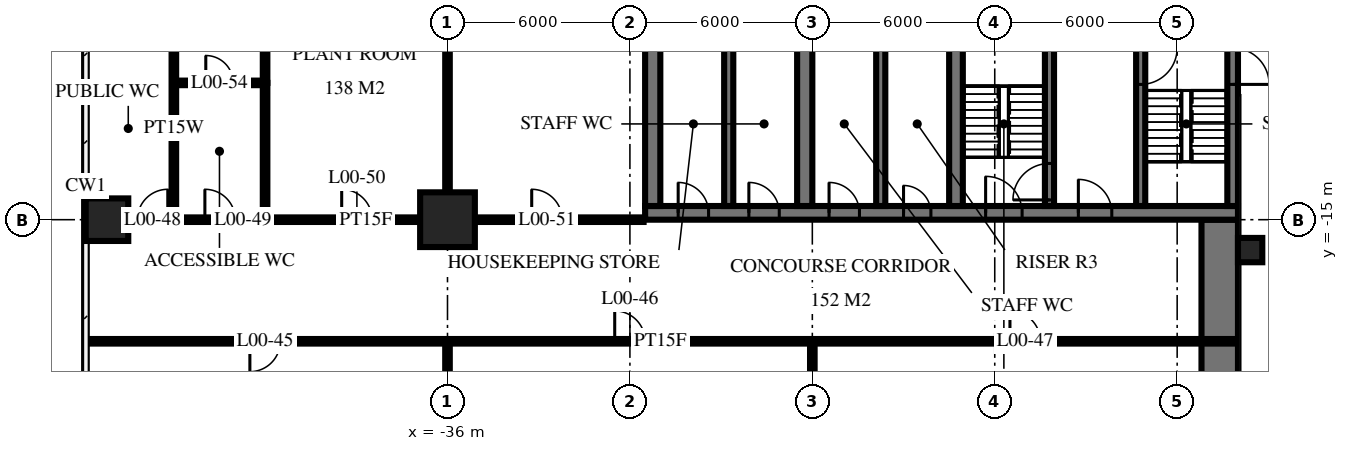
"""IFC4 building model, lengths in metres.
Left out: names, types, materials, properties, quantities, classifications, styles, units other than length and angle.
Written with IfcOpenShell. Run it as: python <this file> out.ifc"""

import sys

from ifc_helpers import new_model, si_unit, direction, frame, frame_2d, origin, origin_2d, place, context, subcontext, project, spatial, rectangle, circle, extrude, element, fill, save


model = new_model("IFC4")
c1 = context("Model", 3, precision=1e-05, world=origin(), true_north=direction((0.0, 1.0)))
c2 = subcontext(c1, "Body", "Model", "MODEL_VIEW")
j1 = project(units=[si_unit("LENGTHUNIT", "METRE"), si_unit("PLANEANGLEUNIT", "RADIAN")], contexts=[c1])
p1 = place(None, origin())
s1 = spatial("IfcSite", under=j1, at=p1, CompositionType="ELEMENT")
p2 = place(p1, origin())
s2 = spatial("IfcBuilding", under=s1, at=p2, CompositionType="ELEMENT")
p3 = place(p2, origin())
s3 = spatial("IfcBuildingStorey", under=s2, at=p3, CompositionType="ELEMENT", Elevation=0.0)
p4 = place(p3, frame((-47.2, -15.0, -0.3), z_axis=(0.0, 0.0, 1.0), x_axis=(1.0, 0.0, 0.0)))
e1 = element("IfcColumn", 1, at=p4, inside=s3, PredefinedType="COLUMN", context=c2, shape_type="SweptSolid", body=[
    extrude(circle(Radius=0.7, at=origin_2d()), origin(), (0.0, 0.0, 1.0), 7.3),
])
p5 = place(p3, frame((-36.0, -15.0, -0.3), z_axis=(0.0, 0.0, 1.0), x_axis=(1.0, 0.0, 0.0)))
e2 = element("IfcColumn", 2, at=p5, inside=s3, PredefinedType="COLUMN", context=c2, shape_type="SweptSolid", body=[
    extrude(circle(Radius=0.9, at=origin_2d()), origin(), (0.0, 0.0, 1.0), 7.3),
])
p6 = place(p3, frame((-29.5, -14.775, -0.3), z_axis=(0.0, 0.0, 1.0), x_axis=(1.0, 0.0, 0.0)))
e3 = element("IfcWall", 3, at=p6, inside=s3, PredefinedType="SHEAR", context=c2, shape_type="SweptSolid", body=[
    extrude(rectangle(XDim=19.5, YDim=0.45, at=frame_2d((9.75, 0.0))), origin(), (0.0, 0.0, 1.0), 7.3),
])
p7 = place(p6, frame((11.2, 0.0, 0.3)))
e4 = element("IfcOpeningElement", 4, at=p7, cuts=e3, PredefinedType="OPENING", context=c2, shape_type="SweptSolid", body=[
    extrude(rectangle(XDim=1.2, YDim=2.1, at=frame_2d((0.6, 1.05))), frame((0.0, 0.235, 0.0), z_axis=(0.0, -1.0, 0.0), x_axis=(1.0, 0.0, 0.0)), (0.0, 0.0, 1.0), 0.47),
])
p8 = place(p6, frame((14.25, 0.0, 0.3)))
e5 = element("IfcOpeningElement", 5, at=p8, cuts=e3, PredefinedType="OPENING", context=c2, shape_type="SweptSolid", body=[
    extrude(rectangle(XDim=1.1, YDim=2.1, at=frame_2d((0.55, 1.05))), frame((0.0, 0.235, 0.0), z_axis=(0.0, -1.0, 0.0), x_axis=(1.0, 0.0, 0.0)), (0.0, 0.0, 1.0), 0.47),
])
p9 = place(p6, frame((8.5, 0.0, 0.3)))
e6 = element("IfcOpeningElement", 6, at=p9, cuts=e3, PredefinedType="OPENING", context=c2, shape_type="SweptSolid", body=[
    extrude(rectangle(XDim=0.9, YDim=2.1, at=frame_2d((0.45, 1.05))), frame((0.0, 0.235, 0.0), z_axis=(0.0, -1.0, 0.0), x_axis=(1.0, 0.0, 0.0)), (0.0, 0.0, 1.0), 0.47),
])
p10 = place(p6, frame((6.05, 0.0, 0.3)))
e7 = element("IfcOpeningElement", 7, at=p10, cuts=e3, PredefinedType="OPENING", context=c2, shape_type="SweptSolid", body=[
    extrude(rectangle(XDim=1.0, YDim=2.1, at=frame_2d((0.5, 1.05))), frame((0.0, 0.235, 0.0), z_axis=(0.0, -1.0, 0.0), x_axis=(1.0, 0.0, 0.0)), (0.0, 0.0, 1.0), 0.47),
])
p11 = place(p6, frame((3.413, 0.0, 0.3)))
e8 = element("IfcOpeningElement", 8, at=p11, cuts=e3, PredefinedType="OPENING", context=c2, shape_type="SweptSolid", body=[
    extrude(rectangle(XDim=1.0, YDim=2.1, at=frame_2d((0.5, 1.05))), frame((0.0, 0.235, 0.0), z_axis=(0.0, -1.0, 0.0), x_axis=(1.0, 0.0, 0.0)), (0.0, 0.0, 1.0), 0.47),
])
p12 = place(p6, frame((1.087, 0.0, 0.3)))
e9 = element("IfcOpeningElement", 9, at=p12, cuts=e3, PredefinedType="OPENING", context=c2, shape_type="SweptSolid", body=[
    extrude(rectangle(XDim=1.0, YDim=2.1, at=frame_2d((0.5, 1.05))), frame((0.0, 0.235, 0.0), z_axis=(0.0, -1.0, 0.0), x_axis=(1.0, 0.0, 0.0)), (0.0, 0.0, 1.0), 0.47),
])
p13 = place(p3, frame((-10.175, -14.55, -0.3), z_axis=(0.0, 0.0, 1.0), x_axis=(0.0, 1.0, 0.0)))
e10 = element("IfcWall", 10, at=p13, inside=s3, PredefinedType="SHEAR", context=c2, shape_type="SweptSolid", body=[
    extrude(rectangle(XDim=14.1, YDim=0.35, at=frame_2d((7.05, 0.0))), origin(), (0.0, 0.0, 1.0), 7.3),
])
p14 = place(p13, frame((8.4, 0.0, 0.3)))
e11 = element("IfcOpeningElement", 11, at=p14, cuts=e10, PredefinedType="OPENING", context=c2, shape_type="SweptSolid", body=[
    extrude(rectangle(XDim=1.4, YDim=2.4, at=frame_2d((0.7, 1.2))), frame((0.0, 0.185, 0.0), z_axis=(0.0, -1.0, 0.0), x_axis=(1.0, 0.0, 0.0)), (0.0, 0.0, 1.0), 0.37),
])
p15 = place(p13, frame((10.0, 0.0, 0.3)))
e12 = element("IfcOpeningElement", 12, at=p15, cuts=e10, PredefinedType="OPENING", context=c2, shape_type="SweptSolid", body=[
    extrude(rectangle(XDim=1.4, YDim=2.4, at=frame_2d((0.7, 1.2))), frame((0.0, 0.185, 0.0), z_axis=(0.0, -1.0, 0.0), x_axis=(1.0, 0.0, 0.0)), (0.0, 0.0, 1.0), 0.37),
])
p16 = place(p13, frame((4.0, 0.0, 0.3)))
e13 = element("IfcOpeningElement", 13, at=p16, cuts=e10, PredefinedType="OPENING", context=c2, shape_type="SweptSolid", body=[
    extrude(rectangle(XDim=1.2, YDim=2.1, at=frame_2d((0.6, 1.05))), frame((0.0, 0.185, 0.0), z_axis=(0.0, -1.0, 0.0), x_axis=(1.0, 0.0, 0.0)), (0.0, 0.0, 1.0), 0.37),
])
p17 = place(p3, frame((-29.25, -14.55, -0.3), z_axis=(0.0, 0.0, 1.0), x_axis=(0.0, 1.0, 0.0)))
e14 = element("IfcWall", 14, at=p17, inside=s3, PredefinedType="SHEAR", context=c2, shape_type="SweptSolid", body=[
    extrude(rectangle(XDim=14.1, YDim=0.5, at=frame_2d((7.05, 0.0))), origin(), (0.0, 0.0, 1.0), 7.3),
])
p18 = place(p3, frame((-13.2, -14.55, -0.3), z_axis=(0.0, 0.0, 1.0), x_axis=(0.0, 1.0, 0.0)))
e15 = element("IfcWall", 15, at=p18, inside=s3, PredefinedType="SHEAR", context=c2, shape_type="SweptSolid", body=[
    extrude(rectangle(XDim=5.4, YDim=0.3, at=frame_2d((2.7, 0.0))), origin(), (0.0, 0.0, 1.0), 7.3),
])
p19 = place(p18, frame((4.0, 0.0, 0.3)))
e16 = element("IfcOpeningElement", 16, at=p19, cuts=e15, PredefinedType="OPENING", context=c2, shape_type="SweptSolid", body=[
    extrude(rectangle(XDim=1.2, YDim=2.1, at=frame_2d((0.6, 1.05))), frame((0.0, 0.16, 0.0), z_axis=(0.0, -1.0, 0.0), x_axis=(1.0, 0.0, 0.0)), (0.0, 0.0, 1.0), 0.32),
])
p20 = place(p3, frame((-16.2, -14.55, -0.3), z_axis=(0.0, 0.0, 1.0), x_axis=(0.0, 1.0, 0.0)))
e17 = element("IfcWall", 17, at=p20, inside=s3, PredefinedType="SHEAR", context=c2, shape_type="SweptSolid", body=[
    extrude(rectangle(XDim=5.4, YDim=0.3, at=frame_2d((2.7, 0.0))), origin(), (0.0, 0.0, 1.0), 7.3),
])
p21 = place(p20, frame((0.2, 0.0, 0.3)))
e18 = element("IfcOpeningElement", 18, at=p21, cuts=e17, PredefinedType="OPENING", context=c2, shape_type="SweptSolid", body=[
    extrude(rectangle(XDim=1.2, YDim=2.1, at=frame_2d((0.6, 1.05))), frame((0.0, 0.16, 0.0), z_axis=(0.0, -1.0, 0.0), x_axis=(1.0, 0.0, 0.0)), (0.0, 0.0, 1.0), 0.32),
])
p22 = place(p3, frame((-19.275, -14.55, -0.3), z_axis=(0.0, 0.0, 1.0), x_axis=(0.0, 1.0, 0.0)))
e19 = element("IfcWall", 19, at=p22, inside=s3, PredefinedType="SHEAR", context=c2, shape_type="SweptSolid", body=[
    extrude(rectangle(XDim=5.4, YDim=0.45, at=frame_2d((2.7, 0.0))), origin(), (0.0, 0.0, 1.0), 7.3),
])
p23 = place(p3, frame((-21.75, -14.55, -0.3), z_axis=(0.0, 0.0, 1.0), x_axis=(0.0, 1.0, 0.0)))
e20 = element("IfcWall", 20, at=p23, inside=s3, PredefinedType="SHEAR", context=c2, shape_type="SweptSolid", body=[
    extrude(rectangle(XDim=5.4, YDim=0.3, at=frame_2d((2.7, 0.0))), origin(), (0.0, 0.0, 1.0), 7.3),
])
p24 = place(p3, frame((-24.25, -14.55, -0.3), z_axis=(0.0, 0.0, 1.0), x_axis=(0.0, 1.0, 0.0)))
e21 = element("IfcWall", 21, at=p24, inside=s3, PredefinedType="SHEAR", context=c2, shape_type="SweptSolid", body=[
    extrude(rectangle(XDim=5.4, YDim=0.5, at=frame_2d((2.7, 0.0))), origin(), (0.0, 0.0, 1.0), 7.3),
])
p25 = place(p3, frame((-26.75, -14.55, -0.3), z_axis=(0.0, 0.0, 1.0), x_axis=(0.0, 1.0, 0.0)))
e22 = element("IfcWall", 22, at=p25, inside=s3, PredefinedType="SHEAR", context=c2, shape_type="SweptSolid", body=[
    extrude(rectangle(XDim=5.4, YDim=0.3, at=frame_2d((2.7, 0.0))), origin(), (0.0, 0.0, 1.0), 7.3),
])
p26 = place(p3, frame((-10.6, -40.0, -0.3), z_axis=(0.0, 0.0, 1.0), x_axis=(0.0, 1.0, 0.0)))
e23 = element("IfcWall", 23, at=p26, inside=s3, PredefinedType="SHEAR", context=c2, shape_type="SweptSolid", body=[
    extrude(rectangle(XDim=25.0, YDim=1.2, at=frame_2d((12.5, 0.0))), origin(), (0.0, 0.0, 1.0), 7.3),
])
p27 = place(p26, frame((8.8, 0.0, 0.3)))
e24 = element("IfcOpeningElement", 24, at=p27, cuts=e23, PredefinedType="OPENING", context=c2, shape_type="SweptSolid", body=[
    extrude(rectangle(XDim=2.4, YDim=2.7, at=frame_2d((1.2, 1.35))), frame((0.0, 0.61, 0.0), z_axis=(0.0, -1.0, 0.0), x_axis=(1.0, 0.0, 0.0)), (0.0, 0.0, 1.0), 1.22),
])
p28 = place(p3, frame((-9.6, -16.0, -0.3), z_axis=(0.0, 0.0, 1.0), x_axis=(1.0, 0.0, 0.0)))
e25 = element("IfcColumn", 25, at=p28, inside=s3, PredefinedType="COLUMN", context=c2, shape_type="SweptSolid", body=[
    extrude(rectangle(XDim=0.8, YDim=0.8, at=origin_2d()), origin(), (0.0, 0.0, 1.0), 7.3),
])
for number, where, z_axis, x_axis in (
    (26, (-24.0, -39.82, 0.0), (0.0, 0.0, 1.0), (0.0, 1.0, 0.0)),
    (27, (-36.0, -39.82, 0.0), (0.0, 0.0, 1.0), (0.0, 1.0, 0.0)),
):
    element("IfcWall", number, at=place(p3, frame(where, z_axis=z_axis, x_axis=x_axis)), inside=s3, PredefinedType="PARTITIONING", context=c2, shape_type="SweptSolid", body=[
        extrude(rectangle(XDim=20.82, YDim=0.15, at=frame_2d((10.41, 0.0))), origin(), (0.0, 0.0, 1.0), 6.55),
    ])
p29 = place(p3, frame((-36.0, -15.0, 0.0), z_axis=(0.0, 0.0, 1.0), x_axis=(0.0, 1.0, 0.0)))
e28 = element("IfcWall", 28, at=p29, inside=s3, PredefinedType="PARTITIONING", context=c2, shape_type="SweptSolid", body=[
    extrude(rectangle(XDim=22.82, YDim=0.15, at=frame_2d((11.41, 0.0))), origin(), (0.0, 0.0, 1.0), 6.55),
])
p30 = place(p3, frame((-42.0, -10.5, 0.0), z_axis=(0.0, 0.0, 1.0), x_axis=(0.0, 1.0, 0.0)))
e29 = element("IfcWall", 29, at=p30, inside=s3, PredefinedType="PARTITIONING", context=c2, shape_type="SweptSolid", body=[
    extrude(rectangle(XDim=18.316, YDim=0.15, at=frame_2d((9.158, 0.0))), origin(), (0.0, 0.0, 1.0), 6.55),
])
p31 = place(p3, frame((-42.0, -15.0, 0.0), z_axis=(0.0, 0.0, 1.0), x_axis=(0.0, 1.0, 0.0)))
e30 = element("IfcWall", 30, at=p31, inside=s3, PredefinedType="PLUMBINGWALL", context=c2, shape_type="SweptSolid", body=[
    extrude(rectangle(XDim=4.5, YDim=0.15, at=frame_2d((2.25, 0.0))), origin(), (0.0, 0.0, 1.0), 6.55),
])
p32 = place(p3, frame((-45.0, -15.0, 0.0), z_axis=(0.0, 0.0, 1.0), x_axis=(0.0, 1.0, 0.0)))
e31 = element("IfcWall", 31, at=p32, inside=s3, PredefinedType="PLUMBINGWALL", context=c2, shape_type="SweptSolid", body=[
    extrude(rectangle(XDim=6.0, YDim=0.15, at=frame_2d((3.0, 0.0))), origin(), (0.0, 0.0, 1.0), 6.55),
])
p33 = place(p3, frame((-47.82, -19.0, 0.0), z_axis=(0.0, 0.0, 1.0), x_axis=(1.0, 0.0, 0.0)))
e32 = element("IfcWall", 32, at=p33, inside=s3, PredefinedType="PARTITIONING", context=c2, shape_type="SweptSolid", body=[
    extrude(rectangle(XDim=37.64, YDim=0.15, at=frame_2d((18.82, 0.0))), origin(), (0.0, 0.0, 1.0), 6.55),
])
p34 = place(p33, frame((5.32, 0.0, 0.0)))
e33 = element("IfcOpeningElement", 33, at=p34, cuts=e32, PredefinedType="OPENING", context=c2, shape_type="SweptSolid", body=[
    extrude(rectangle(XDim=1.0, YDim=2.1, at=frame_2d((0.5, 1.05))), frame((0.0, 0.085, 0.0), z_axis=(0.0, -1.0, 0.0), x_axis=(1.0, 0.0, 0.0)), (0.0, 0.0, 1.0), 0.17),
])
p35 = place(p33, frame((17.32, 0.0, 0.0)))
e34 = element("IfcOpeningElement", 34, at=p35, cuts=e32, PredefinedType="OPENING", context=c2, shape_type="SweptSolid", body=[
    extrude(rectangle(XDim=1.0, YDim=2.1, at=frame_2d((0.5, 1.05))), frame((0.0, 0.085, 0.0), z_axis=(0.0, -1.0, 0.0), x_axis=(1.0, 0.0, 0.0)), (0.0, 0.0, 1.0), 0.17),
])
p36 = place(p33, frame((30.32, 0.0, 0.0)))
e35 = element("IfcOpeningElement", 35, at=p36, cuts=e32, PredefinedType="OPENING", context=c2, shape_type="SweptSolid", body=[
    extrude(rectangle(XDim=1.0, YDim=2.1, at=frame_2d((0.5, 1.05))), frame((0.0, 0.085, 0.0), z_axis=(0.0, -1.0, 0.0), x_axis=(1.0, 0.0, 0.0)), (0.0, 0.0, 1.0), 0.17),
])
p37 = place(p3, frame((-47.82, -15.0, 0.0), z_axis=(0.0, 0.0, 1.0), x_axis=(1.0, 0.0, 0.0)))
e36 = element("IfcWall", 36, at=p37, inside=s3, PredefinedType="PARTITIONING", context=c2, shape_type="SweptSolid", body=[
    extrude(rectangle(XDim=18.27, YDim=0.15, at=frame_2d((9.135, 0.0))), origin(), (0.0, 0.0, 1.0), 6.55),
])
p38 = place(p37, frame((1.62, 0.0, 0.0)))
e37 = element("IfcOpeningElement", 37, at=p38, cuts=e36, PredefinedType="OPENING", context=c2, shape_type="SweptSolid", body=[
    extrude(rectangle(XDim=1.0, YDim=2.1, at=frame_2d((0.5, 1.05))), frame((0.0, 0.085, 0.0), z_axis=(0.0, -1.0, 0.0), x_axis=(1.0, 0.0, 0.0)), (0.0, 0.0, 1.0), 0.17),
])
p39 = place(p37, frame((3.84, 0.0, 0.0)))
e38 = element("IfcOpeningElement", 38, at=p39, cuts=e36, PredefinedType="OPENING", context=c2, shape_type="SweptSolid", body=[
    extrude(rectangle(XDim=1.0, YDim=2.1, at=frame_2d((0.5, 1.05))), frame((0.0, 0.085, 0.0), z_axis=(0.0, -1.0, 0.0), x_axis=(1.0, 0.0, 0.0)), (0.0, 0.0, 1.0), 0.17),
])
p40 = place(p37, frame((8.34, 0.0, 0.0)))
e39 = element("IfcOpeningElement", 39, at=p40, cuts=e36, PredefinedType="OPENING", context=c2, shape_type="SweptSolid", body=[
    extrude(rectangle(XDim=1.0, YDim=2.1, at=frame_2d((0.5, 1.05))), frame((0.0, 0.085, 0.0), z_axis=(0.0, -1.0, 0.0), x_axis=(1.0, 0.0, 0.0)), (0.0, 0.0, 1.0), 0.17),
])
p41 = place(p37, frame((14.59, 0.0, 0.0)))
e40 = element("IfcOpeningElement", 40, at=p41, cuts=e36, PredefinedType="OPENING", context=c2, shape_type="SweptSolid", body=[
    extrude(rectangle(XDim=1.0, YDim=2.1, at=frame_2d((0.5, 1.05))), frame((0.0, 0.085, 0.0), z_axis=(0.0, -1.0, 0.0), x_axis=(1.0, 0.0, 0.0)), (0.0, 0.0, 1.0), 0.17),
])
p42 = place(p3, frame((-45.0, -10.5, 0.0), z_axis=(0.0, 0.0, 1.0), x_axis=(1.0, 0.0, 0.0)))
e41 = element("IfcWall", 41, at=p42, inside=s3, PredefinedType="PLUMBINGWALL", context=c2, shape_type="SweptSolid", body=[
    extrude(rectangle(XDim=3.0, YDim=0.15, at=frame_2d((1.5, 0.0))), origin(), (0.0, 0.0, 1.0), 6.55),
])
p43 = place(p42, frame((1.05, 0.0, 0.0)))
e42 = element("IfcOpeningElement", 42, at=p43, cuts=e41, PredefinedType="OPENING", context=c2, shape_type="SweptSolid", body=[
    extrude(rectangle(XDim=0.9, YDim=2.1, at=frame_2d((0.45, 1.05))), frame((0.0, 0.085, 0.0), z_axis=(0.0, -1.0, 0.0), x_axis=(1.0, 0.0, 0.0)), (0.0, 0.0, 1.0), 0.17),
])
p44 = place(p16, frame((0.6, 0.0, 0.0), z_axis=(0.0, 0.0, 1.0), x_axis=(-1.0, 0.0, 0.0)))
e43 = element("IfcDoor", 43, at=p44, inside=s3, OperationType="SINGLE_SWING_LEFT", PredefinedType="DOOR", context=c2, shape_type="SweptSolid", body=[
    extrude(rectangle(XDim=1.2, YDim=2.1, at=frame_2d((0.0, 1.05))), frame((0.0, -0.025, 0.0), z_axis=(0.0, 1.0, 0.0), x_axis=(-1.0, 0.0, 0.0)), (0.0, 0.0, 1.0), 0.05),
])
fill(e13, e43)
p45 = place(p7, origin())
e44 = element("IfcDoor", 44, at=p45, inside=s3, OperationType="SINGLE_SWING_RIGHT", PredefinedType="DOOR", context=c2, shape_type="SweptSolid", body=[
    extrude(rectangle(XDim=1.2, YDim=2.1, at=frame_2d((0.6, 1.05))), frame((0.0, 0.025, 0.0), z_axis=(0.0, -1.0, 0.0), x_axis=(1.0, 0.0, 0.0)), (0.0, 0.0, 1.0), 0.05),
])
fill(e4, e44)
p46 = place(p8, origin())
e45 = element("IfcDoor", 45, at=p46, inside=s3, OperationType="SINGLE_SWING_RIGHT", PredefinedType="DOOR", context=c2, shape_type="SweptSolid", body=[
    extrude(rectangle(XDim=1.1, YDim=2.1, at=frame_2d((0.55, 1.05))), frame((0.0, 0.025, 0.0), z_axis=(0.0, -1.0, 0.0), x_axis=(1.0, 0.0, 0.0)), (0.0, 0.0, 1.0), 0.05),
])
fill(e5, e45)
p47 = place(p9, origin())
e46 = element("IfcDoor", 46, at=p47, inside=s3, OperationType="SINGLE_SWING_RIGHT", PredefinedType="DOOR", context=c2, shape_type="SweptSolid", body=[
    extrude(rectangle(XDim=0.9, YDim=2.1, at=frame_2d((0.45, 1.05))), frame((0.0, 0.025, 0.0), z_axis=(0.0, -1.0, 0.0), x_axis=(1.0, 0.0, 0.0)), (0.0, 0.0, 1.0), 0.05),
])
fill(e6, e46)
p48 = place(p10, origin())
e47 = element("IfcDoor", 47, at=p48, inside=s3, OperationType="SINGLE_SWING_RIGHT", PredefinedType="DOOR", context=c2, shape_type="SweptSolid", body=[
    extrude(rectangle(XDim=1.0, YDim=2.1, at=frame_2d((0.5, 1.05))), frame((0.0, 0.025, 0.0), z_axis=(0.0, -1.0, 0.0), x_axis=(1.0, 0.0, 0.0)), (0.0, 0.0, 1.0), 0.05),
])
fill(e7, e47)
p49 = place(p11, origin())
e48 = element("IfcDoor", 48, at=p49, inside=s3, OperationType="SINGLE_SWING_RIGHT", PredefinedType="DOOR", context=c2, shape_type="SweptSolid", body=[
    extrude(rectangle(XDim=1.0, YDim=2.1, at=frame_2d((0.5, 1.05))), frame((0.0, 0.025, 0.0), z_axis=(0.0, -1.0, 0.0), x_axis=(1.0, 0.0, 0.0)), (0.0, 0.0, 1.0), 0.05),
])
fill(e8, e48)
p50 = place(p12, origin())
e49 = element("IfcDoor", 49, at=p50, inside=s3, OperationType="SINGLE_SWING_RIGHT", PredefinedType="DOOR", context=c2, shape_type="SweptSolid", body=[
    extrude(rectangle(XDim=1.0, YDim=2.1, at=frame_2d((0.5, 1.05))), frame((0.0, 0.025, 0.0), z_axis=(0.0, -1.0, 0.0), x_axis=(1.0, 0.0, 0.0)), (0.0, 0.0, 1.0), 0.05),
])
fill(e9, e49)
p51 = place(p19, frame((0.6, 0.0, 0.0), z_axis=(0.0, 0.0, 1.0), x_axis=(-1.0, 0.0, 0.0)))
e50 = element("IfcDoor", 50, at=p51, inside=s3, OperationType="SINGLE_SWING_RIGHT", PredefinedType="DOOR", context=c2, shape_type="SweptSolid", body=[
    extrude(rectangle(XDim=1.2, YDim=2.1, at=frame_2d((0.0, 1.05))), frame((0.0, -0.025, 0.0), z_axis=(0.0, 1.0, 0.0), x_axis=(-1.0, 0.0, 0.0)), (0.0, 0.0, 1.0), 0.05),
])
fill(e16, e50)
p52 = place(p21, origin())
e51 = element("IfcDoor", 51, at=p52, inside=s3, OperationType="SINGLE_SWING_RIGHT", PredefinedType="DOOR", context=c2, shape_type="SweptSolid", body=[
    extrude(rectangle(XDim=1.2, YDim=2.1, at=frame_2d((0.6, 1.05))), frame((0.0, 0.025, 0.0), z_axis=(0.0, -1.0, 0.0), x_axis=(1.0, 0.0, 0.0)), (0.0, 0.0, 1.0), 0.05),
])
fill(e18, e51)
p53 = place(p34, frame((0.5, 0.0, 0.0), z_axis=(0.0, 0.0, 1.0), x_axis=(-1.0, 0.0, 0.0)))
e52 = element("IfcDoor", 52, at=p53, inside=s3, OperationType="SINGLE_SWING_LEFT", PredefinedType="DOOR", context=c2, shape_type="SweptSolid", body=[
    extrude(rectangle(XDim=1.0, YDim=2.1, at=frame_2d((0.0, 1.05))), frame((0.0, -0.025, 0.0), z_axis=(0.0, 1.0, 0.0), x_axis=(-1.0, 0.0, 0.0)), (0.0, 0.0, 1.0), 0.05),
])
fill(e33, e52)
p54 = place(p35, origin())
e53 = element("IfcDoor", 53, at=p54, inside=s3, OperationType="SINGLE_SWING_RIGHT", PredefinedType="DOOR", context=c2, shape_type="SweptSolid", body=[
    extrude(rectangle(XDim=1.0, YDim=2.1, at=frame_2d((0.5, 1.05))), frame((0.0, 0.025, 0.0), z_axis=(0.0, -1.0, 0.0), x_axis=(1.0, 0.0, 0.0)), (0.0, 0.0, 1.0), 0.05),
])
fill(e34, e53)
p55 = place(p36, origin())
e54 = element("IfcDoor", 54, at=p55, inside=s3, OperationType="SINGLE_SWING_RIGHT", PredefinedType="DOOR", context=c2, shape_type="SweptSolid", body=[
    extrude(rectangle(XDim=1.0, YDim=2.1, at=frame_2d((0.5, 1.05))), frame((0.0, 0.025, 0.0), z_axis=(0.0, -1.0, 0.0), x_axis=(1.0, 0.0, 0.0)), (0.0, 0.0, 1.0), 0.05),
])
fill(e35, e54)
p56 = place(p38, origin())
e55 = element("IfcDoor", 55, at=p56, inside=s3, OperationType="SINGLE_SWING_LEFT", PredefinedType="DOOR", context=c2, shape_type="SweptSolid", body=[
    extrude(rectangle(XDim=1.0, YDim=2.1, at=frame_2d((0.5, 1.05))), frame((0.0, 0.025, 0.0), z_axis=(0.0, -1.0, 0.0), x_axis=(1.0, 0.0, 0.0)), (0.0, 0.0, 1.0), 0.05),
])
fill(e37, e55)
p57 = place(p39, origin())
e56 = element("IfcDoor", 56, at=p57, inside=s3, OperationType="SINGLE_SWING_RIGHT", PredefinedType="DOOR", context=c2, shape_type="SweptSolid", body=[
    extrude(rectangle(XDim=1.0, YDim=2.1, at=frame_2d((0.5, 1.05))), frame((0.0, 0.025, 0.0), z_axis=(0.0, -1.0, 0.0), x_axis=(1.0, 0.0, 0.0)), (0.0, 0.0, 1.0), 0.05),
])
fill(e38, e56)
p58 = place(p40, origin())
e57 = element("IfcDoor", 57, at=p58, inside=s3, OperationType="SINGLE_SWING_RIGHT", PredefinedType="DOOR", context=c2, shape_type="SweptSolid", body=[
    extrude(rectangle(XDim=1.0, YDim=2.1, at=frame_2d((0.5, 1.05))), frame((0.0, 0.025, 0.0), z_axis=(0.0, -1.0, 0.0), x_axis=(1.0, 0.0, 0.0)), (0.0, 0.0, 1.0), 0.05),
])
fill(e39, e57)
p59 = place(p41, origin())
e58 = element("IfcDoor", 58, at=p59, inside=s3, OperationType="SINGLE_SWING_RIGHT", PredefinedType="DOOR", context=c2, shape_type="SweptSolid", body=[
    extrude(rectangle(XDim=1.0, YDim=2.1, at=frame_2d((0.5, 1.05))), frame((0.0, 0.025, 0.0), z_axis=(0.0, -1.0, 0.0), x_axis=(1.0, 0.0, 0.0)), (0.0, 0.0, 1.0), 0.05),
])
fill(e40, e58)
p60 = place(p43, origin())
e59 = element("IfcDoor", 59, at=p60, inside=s3, OperationType="SINGLE_SWING_RIGHT", PredefinedType="DOOR", context=c2, shape_type="SweptSolid", body=[
    extrude(rectangle(XDim=0.9, YDim=2.1, at=frame_2d((0.45, 1.05))), frame((0.0, 0.025, 0.0), z_axis=(0.0, -1.0, 0.0), x_axis=(1.0, 0.0, 0.0)), (0.0, 0.0, 1.0), 0.05),
])
fill(e42, e59)
save(model, sys.argv[1])
